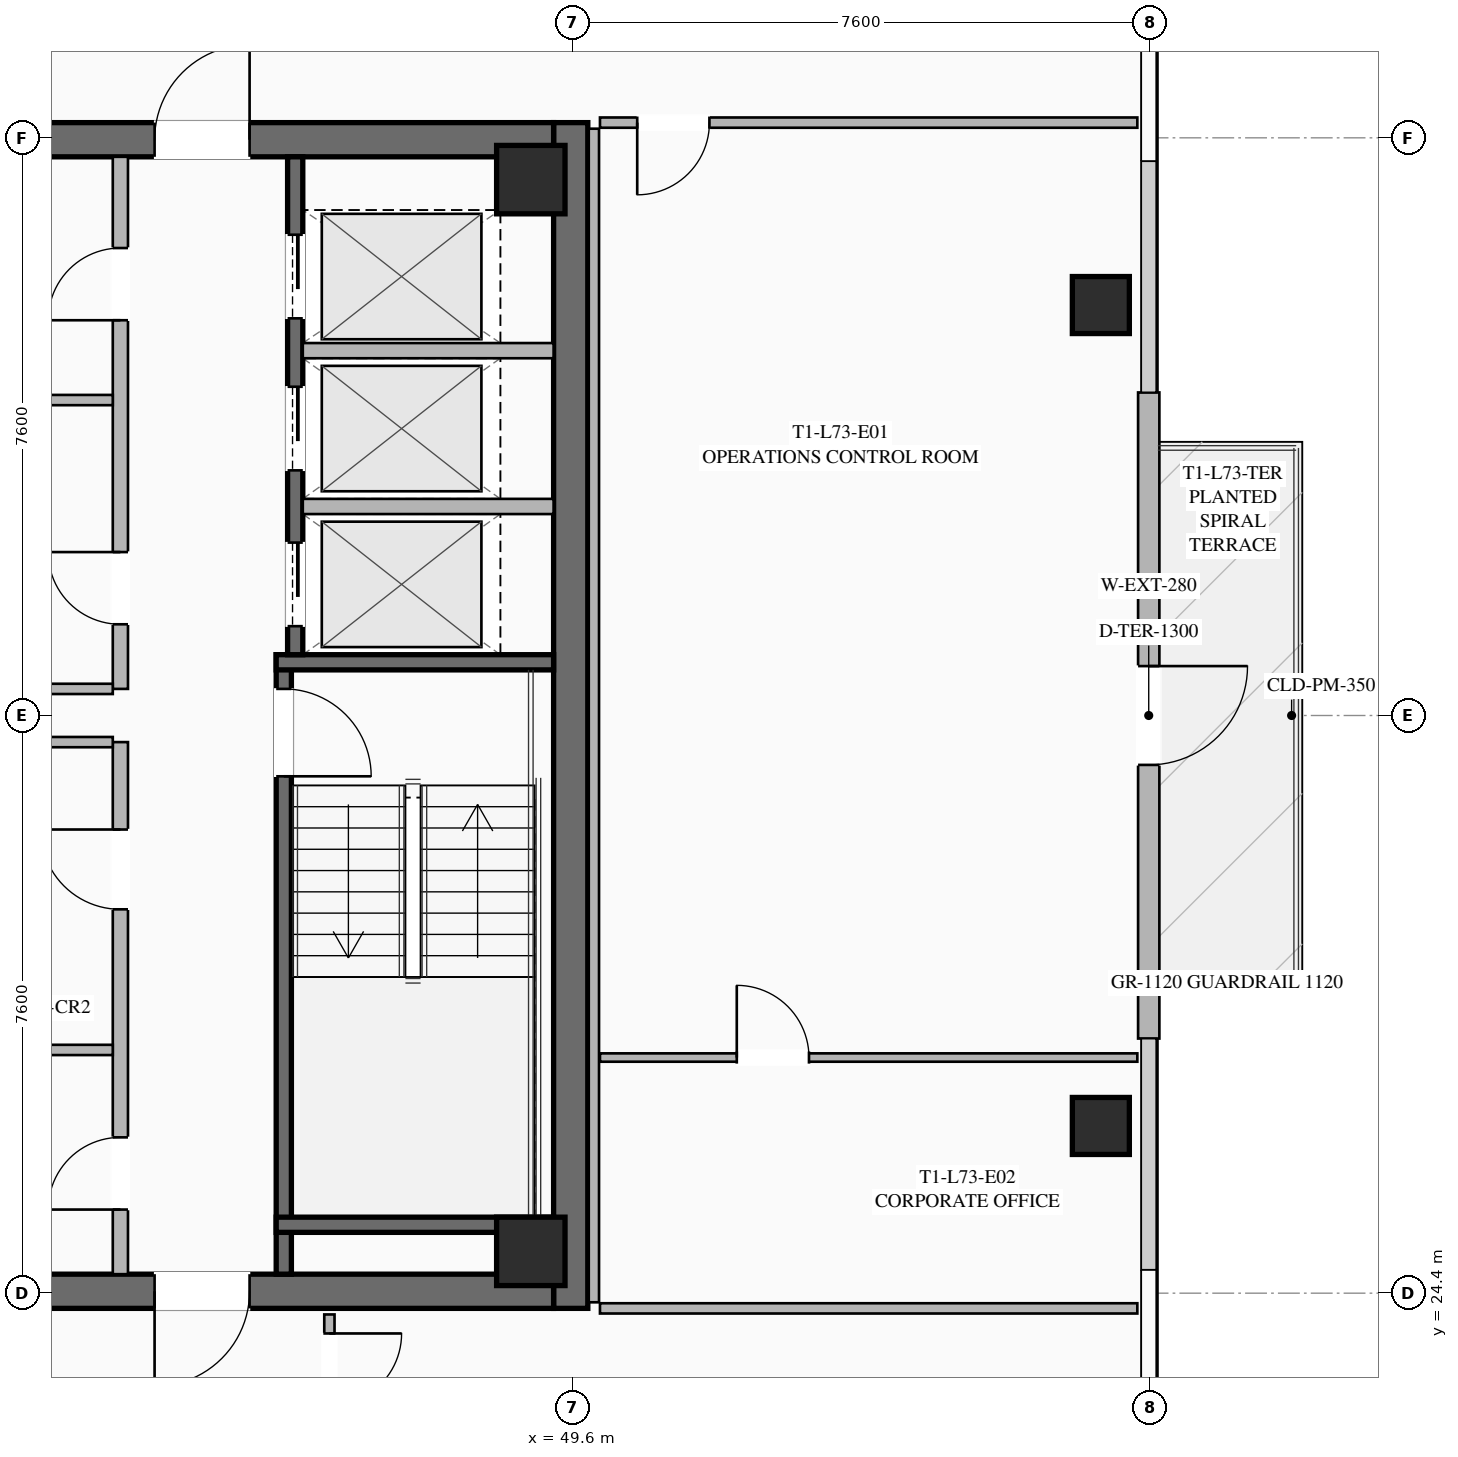
"""IFC4 building model, lengths in metres.
Left out: names, types, materials, properties, quantities, classifications, styles, units other than length and angle.
Written with IfcOpenShell. Run it as: python <this file> out.ifc"""

import sys

from ifc_helpers import new_model, si_unit, direction, frame, frame_2d, origin, origin_2d, place, context, subcontext, project, spatial, rectangle, hollow_rectangle, extrude, element, fill, save


model = new_model("IFC4")
c1 = context("Model", 3, precision=1e-05, world=origin(), true_north=direction((0.0, 1.0)))
c2 = subcontext(c1, "Body", "Model", "MODEL_VIEW")
j1 = project(units=[si_unit("LENGTHUNIT", "METRE"), si_unit("PLANEANGLEUNIT", "RADIAN")], contexts=[c1])
p1 = place(None, origin())
s1 = spatial("IfcSite", under=j1, at=p1, CompositionType="ELEMENT")
p2 = place(p1, origin())
s2 = spatial("IfcBuilding", under=s1, at=p2, CompositionType="ELEMENT")
p3 = place(p2, frame((0.0, 0.0, 270.5)))
s3 = spatial("IfcBuildingStorey", under=s2, at=p3, CompositionType="ELEMENT", Elevation=270.5)
p4 = place(p3, frame((49.575, 39.8, 0.0), z_axis=(0.0, 0.0, 1.0), x_axis=(0.0, -1.0, 0.0)))
e1 = element("IfcWall", 1, at=p4, inside=s3, PredefinedType="SHEAR", context=c2, shape_type="SweptSolid", body=[
    extrude(rectangle(XDim=15.6, YDim=0.45, at=frame_2d((7.8, 0.0))), origin(), (0.0, 0.0, 1.0), 3.55),
])
p5 = place(p3, frame((49.35, 24.425, 0.0), z_axis=(0.0, 0.0, 1.0), x_axis=(-1.0, 0.0, 0.0)))
e2 = element("IfcWall", 2, at=p5, inside=s3, PredefinedType="SHEAR", context=c2, shape_type="SweptSolid", body=[
    extrude(rectangle(XDim=14.7, YDim=0.45, at=frame_2d((7.35, 0.0))), origin(), (0.0, 0.0, 1.0), 3.55),
])
p6 = place(p5, frame((9.05, 0.0, 0.0)))
e3 = element("IfcOpeningElement", 3, at=p6, cuts=e2, PredefinedType="OPENING", context=c2, shape_type="SweptSolid", body=[
    extrude(rectangle(XDim=1.25, YDim=2.25, at=frame_2d((0.625, 1.125))), frame((0.0, 0.235, 0.0), z_axis=(0.0, -1.0, 0.0), x_axis=(1.0, 0.0, 0.0)), (0.0, 0.0, 1.0), 0.47),
])
p7 = place(p5, frame((4.0, 0.0, 0.0)))
e4 = element("IfcOpeningElement", 4, at=p7, cuts=e2, PredefinedType="OPENING", context=c2, shape_type="SweptSolid", body=[
    extrude(rectangle(XDim=1.25, YDim=2.25, at=frame_2d((0.625, 1.125))), frame((0.0, 0.235, 0.0), z_axis=(0.0, -1.0, 0.0), x_axis=(1.0, 0.0, 0.0)), (0.0, 0.0, 1.0), 0.47),
])
p8 = place(p3, frame((34.65, 39.575, 0.0), z_axis=(0.0, 0.0, 1.0), x_axis=(1.0, 0.0, 0.0)))
e5 = element("IfcWall", 5, at=p8, inside=s3, PredefinedType="SHEAR", context=c2, shape_type="SweptSolid", body=[
    extrude(rectangle(XDim=14.7, YDim=0.45, at=frame_2d((7.35, 0.0))), origin(), (0.0, 0.0, 1.0), 3.55),
])
p9 = place(p8, frame((4.4, 0.0, 0.0)))
e6 = element("IfcOpeningElement", 6, at=p9, cuts=e5, PredefinedType="OPENING", context=c2, shape_type="SweptSolid", body=[
    extrude(rectangle(XDim=1.25, YDim=2.25, at=frame_2d((0.625, 1.125))), frame((0.0, 0.235, 0.0), z_axis=(0.0, -1.0, 0.0), x_axis=(1.0, 0.0, 0.0)), (0.0, 0.0, 1.0), 0.47),
])
p10 = place(p8, frame((9.45, 0.0, 0.0)))
e7 = element("IfcOpeningElement", 7, at=p10, cuts=e5, PredefinedType="OPENING", context=c2, shape_type="SweptSolid", body=[
    extrude(rectangle(XDim=1.25, YDim=2.25, at=frame_2d((0.625, 1.125))), frame((0.0, 0.235, 0.0), z_axis=(0.0, -1.0, 0.0), x_axis=(1.0, 0.0, 0.0)), (0.0, 0.0, 1.0), 0.47),
])
for number, where, z_axis, x_axis in (
    (8, (49.05, 24.95, 0.0), (0.0, 0.0, 1.0), (1.0, 0.0, 0.0)),
    (9, (49.05, 39.05, 0.0), (0.0, 0.0, 1.0), (1.0, 0.0, 0.0)),
):
    element("IfcColumn", number, at=place(p3, frame(where, z_axis=z_axis, x_axis=x_axis)), inside=s3, PredefinedType="COLUMN", context=c2, shape_type="SweptSolid", body=[
        extrude(hollow_rectangle(XDim=0.9, YDim=0.9, WallThickness=0.04, at=origin_2d()), origin(), (0.0, 0.0, 1.0), 3.37),
    ])
for number, where, z_axis, x_axis in (
    (10, (56.55, 26.6, 0.0), (0.0, 0.0, 1.0), (1.0, 0.0, 0.0)),
    (11, (56.55, 37.4, 0.0), (0.0, 0.0, 1.0), (1.0, 0.0, 0.0)),
):
    element("IfcColumn", number, at=place(p3, frame(where, z_axis=z_axis, x_axis=x_axis)), inside=s3, PredefinedType="COLUMN", context=c2, shape_type="SweptSolid", body=[
        extrude(hollow_rectangle(XDim=0.75, YDim=0.75, WallThickness=0.032, at=origin_2d()), origin(), (0.0, 0.0, 1.0), 3.37),
    ])
p11 = place(p3, frame((57.18, 36.25, 0.0), z_axis=(0.0, 0.0, 1.0), x_axis=(0.0, -1.0, 0.0)))
e12 = element("IfcWall", 12, at=p11, inside=s3, PredefinedType="SOLIDWALL", context=c2, shape_type="SweptSolid", body=[
    extrude(rectangle(XDim=8.5, YDim=0.28, at=frame_2d((4.25, 0.0))), origin(), (0.0, 0.0, 1.0), 3.37),
])
p12 = place(p11, frame((3.6, 0.0, 0.0)))
e13 = element("IfcOpeningElement", 13, at=p12, cuts=e12, PredefinedType="OPENING", context=c2, shape_type="SweptSolid", body=[
    extrude(rectangle(XDim=1.3, YDim=2.15, at=frame_2d((0.65, 1.075))), frame((0.0, 0.15, 0.0), z_axis=(0.0, -1.0, 0.0), x_axis=(1.0, 0.0, 0.0)), (0.0, 0.0, 1.0), 0.3),
])
p13 = place(p3, frame((45.8, 32.8, 0.0), z_axis=(0.0, 0.0, 1.0), x_axis=(0.0, -1.0, 0.0)))
e14 = element("IfcWall", 14, at=p13, inside=s3, PredefinedType="SHEAR", context=c2, shape_type="SweptSolid", body=[
    extrude(rectangle(XDim=8.15, YDim=0.2, at=frame_2d((4.075, 0.0))), origin(), (0.0, 0.0, 1.0), 3.37),
])
p14 = place(p13, frame((0.45, 0.0, 0.0)))
e15 = element("IfcOpeningElement", 15, at=p14, cuts=e14, PredefinedType="OPENING", context=c2, shape_type="SweptSolid", body=[
    extrude(rectangle(XDim=1.15, YDim=2.2, at=frame_2d((0.575, 1.1))), frame((0.0, 0.11, 0.0), z_axis=(0.0, -1.0, 0.0), x_axis=(1.0, 0.0, 0.0)), (0.0, 0.0, 1.0), 0.22),
])
for number, where, z_axis, x_axis in (
    (16, (45.7, 32.7, 0.0), (0.0, 0.0, 1.0), (1.0, 0.0, 0.0)),
    (17, (45.7, 25.3, 0.0), (0.0, 0.0, 1.0), (1.0, 0.0, 0.0)),
):
    element("IfcWall", number, at=place(p3, frame(where, z_axis=z_axis, x_axis=x_axis)), inside=s3, PredefinedType="SHEAR", context=c2, shape_type="SweptSolid", body=[
        extrude(rectangle(XDim=3.65, YDim=0.2, at=frame_2d((1.825, 0.0))), origin(), (0.0, 0.0, 1.0), 3.37),
    ])
p15 = place(p3, frame((45.95, 39.35, 0.0), z_axis=(0.0, 0.0, 1.0), x_axis=(0.0, -1.0, 0.0)))
e18 = element("IfcWall", 18, at=p15, inside=s3, PredefinedType="SHEAR", context=c2, shape_type="SweptSolid", body=[
    extrude(rectangle(XDim=6.55, YDim=0.2, at=frame_2d((3.275, 0.0))), origin(), (0.0, 0.0, 1.0), 3.37),
])
p16 = place(p15, frame((5.075, 0.0, 0.0)))
e19 = element("IfcOpeningElement", 19, at=p16, cuts=e18, PredefinedType="OPENING", context=c2, shape_type="SweptSolid", body=[
    extrude(rectangle(XDim=1.1, YDim=2.2, at=frame_2d((0.55, 1.1))), frame((0.0, 0.11, 0.0), z_axis=(0.0, -1.0, 0.0), x_axis=(1.0, 0.0, 0.0)), (0.0, 0.0, 1.0), 0.22),
])
p17 = place(p15, frame((3.025, 0.0, 0.0)))
e20 = element("IfcOpeningElement", 20, at=p17, cuts=e18, PredefinedType="OPENING", context=c2, shape_type="SweptSolid", body=[
    extrude(rectangle(XDim=1.1, YDim=2.2, at=frame_2d((0.55, 1.1))), frame((0.0, 0.11, 0.0), z_axis=(0.0, -1.0, 0.0), x_axis=(1.0, 0.0, 0.0)), (0.0, 0.0, 1.0), 0.22),
])
p18 = place(p15, frame((1.025, 0.0, 0.0)))
e21 = element("IfcOpeningElement", 21, at=p18, cuts=e18, PredefinedType="OPENING", context=c2, shape_type="SweptSolid", body=[
    extrude(rectangle(XDim=1.1, YDim=2.2, at=frame_2d((0.55, 1.1))), frame((0.0, 0.11, 0.0), z_axis=(0.0, -1.0, 0.0), x_axis=(1.0, 0.0, 0.0)), (0.0, 0.0, 1.0), 0.22),
])
for number, where, z_axis, x_axis in (
    (22, (46.05, 34.75, 0.0), (0.0, 0.0, 1.0), (1.0, 0.0, 0.0)),
    (23, (46.05, 36.8, 0.0), (0.0, 0.0, 1.0), (1.0, 0.0, 0.0)),
):
    element("IfcWall", number, at=place(p3, frame(where, z_axis=z_axis, x_axis=x_axis)), inside=s3, PredefinedType="SOLIDWALL", context=c2, shape_type="SweptSolid", body=[
        extrude(rectangle(XDim=3.3, YDim=0.2, at=frame_2d((1.65, 0.0))), origin(), (0.0, 0.0, 1.0), 3.37),
    ])
p19 = place(p3, frame((43.65, 24.65, 0.0), z_axis=(0.0, 0.0, 1.0), x_axis=(0.0, 1.0, 0.0)))
e24 = element("IfcWall", 24, at=p19, inside=s3, PredefinedType="SOLIDWALL", context=c2, shape_type="SweptSolid", body=[
    extrude(rectangle(XDim=7.0, YDim=0.2, at=frame_2d((3.5, 0.0))), origin(), (0.0, 0.0, 1.0), 2.723),
])
p20 = place(p19, frame((0.85, 0.0, 0.0)))
e25 = element("IfcOpeningElement", 25, at=p20, cuts=e24, PredefinedType="OPENING", context=c2, shape_type="SweptSolid", body=[
    extrude(rectangle(XDim=0.95, YDim=2.05, at=frame_2d((0.475, 1.025))), frame((0.0, 0.11, 0.0), z_axis=(0.0, -1.0, 0.0), x_axis=(1.0, 0.0, 0.0)), (0.0, 0.0, 1.0), 0.22),
])
p21 = place(p19, frame((4.8, 0.0, 0.0)))
e26 = element("IfcOpeningElement", 26, at=p21, cuts=e24, PredefinedType="OPENING", context=c2, shape_type="SweptSolid", body=[
    extrude(rectangle(XDim=1.05, YDim=2.2, at=frame_2d((0.525, 1.1))), frame((0.0, 0.11, 0.0), z_axis=(0.0, -1.0, 0.0), x_axis=(1.0, 0.0, 0.0)), (0.0, 0.0, 1.0), 0.22),
])
for number, where, z_axis, x_axis in (
    (27, (41.67, 31.65, 0.0), (0.0, 0.0, 1.0), (1.0, 0.0, 0.0)),
    (28, (41.67, 27.6, 0.0), (0.0, 0.0, 1.0), (1.0, 0.0, 0.0)),
):
    element("IfcWall", number, at=place(p3, frame(where, z_axis=z_axis, x_axis=x_axis)), inside=s3, PredefinedType="PARTITIONING", context=c2, shape_type="SweptSolid", body=[
        extrude(rectangle(XDim=1.88, YDim=0.135, at=frame_2d((0.94, 0.0))), origin(), (0.0, 0.0, 1.0), 2.723),
    ])
p22 = place(p3, frame((43.65, 32.35, 0.0), z_axis=(0.0, 0.0, 1.0), x_axis=(0.0, 1.0, 0.0)))
e29 = element("IfcWall", 29, at=p22, inside=s3, PredefinedType="SOLIDWALL", context=c2, shape_type="SweptSolid", body=[
    extrude(rectangle(XDim=7.0, YDim=0.2, at=frame_2d((3.5, 0.0))), origin(), (0.0, 0.0, 1.0), 2.723),
])
p23 = place(p22, frame((0.85, 0.0, 0.0)))
e30 = element("IfcOpeningElement", 30, at=p23, cuts=e29, PredefinedType="OPENING", context=c2, shape_type="SweptSolid", body=[
    extrude(rectangle(XDim=0.95, YDim=2.05, at=frame_2d((0.475, 1.025))), frame((0.0, 0.11, 0.0), z_axis=(0.0, -1.0, 0.0), x_axis=(1.0, 0.0, 0.0)), (0.0, 0.0, 1.0), 0.22),
])
p24 = place(p22, frame((4.85, 0.0, 0.0)))
e31 = element("IfcOpeningElement", 31, at=p24, cuts=e29, PredefinedType="OPENING", context=c2, shape_type="SweptSolid", body=[
    extrude(rectangle(XDim=0.95, YDim=2.05, at=frame_2d((0.475, 1.025))), frame((0.0, 0.11, 0.0), z_axis=(0.0, -1.0, 0.0), x_axis=(1.0, 0.0, 0.0)), (0.0, 0.0, 1.0), 0.22),
])
for number, where, z_axis, x_axis in (
    (32, (41.67, 32.35, 0.0), (0.0, 0.0, 1.0), (1.0, 0.0, 0.0)),
    (33, (41.67, 36.15, 0.0), (0.0, 0.0, 1.0), (1.0, 0.0, 0.0)),
):
    element("IfcWall", number, at=place(p3, frame(where, z_axis=z_axis, x_axis=x_axis)), inside=s3, PredefinedType="PARTITIONING", context=c2, shape_type="SweptSolid", body=[
        extrude(rectangle(XDim=1.88, YDim=0.135, at=frame_2d((0.94, 0.0))), origin(), (0.0, 0.0, 1.0), 2.723),
    ])
p25 = place(p3, frame((46.4, 24.12, 0.0), z_axis=(0.0, 0.0, 1.0), x_axis=(0.0, -1.0, 0.0)))
e34 = element("IfcWall", 34, at=p25, inside=s3, PredefinedType="PARTITIONING", context=c2, shape_type="SweptSolid", body=[
    extrude(rectangle(XDim=1.49, YDim=0.135, at=frame_2d((0.745, 0.0))), origin(), (0.0, 0.0, 1.0), 2.723),
])
p26 = place(p25, frame((0.25, 0.0, 0.0)))
e35 = element("IfcOpeningElement", 35, at=p26, cuts=e34, PredefinedType="OPENING", context=c2, shape_type="SweptSolid", body=[
    extrude(rectangle(XDim=0.95, YDim=2.05, at=frame_2d((0.475, 1.025))), frame((0.0, 0.077, 0.0), z_axis=(0.0, -1.0, 0.0), x_axis=(1.0, 0.0, 0.0)), (0.0, 0.0, 1.0), 0.155),
])
p27 = place(p3, frame((49.88, 39.72, 0.0), z_axis=(0.0, 0.0, 1.0), x_axis=(0.0, -1.0, 0.0)))
e36 = element("IfcWall", 36, at=p27, inside=s3, PredefinedType="PARTITIONING", context=c2, shape_type="SweptSolid", body=[
    extrude(rectangle(XDim=15.44, YDim=0.135, at=frame_2d((7.72, 0.0))), origin(), (0.0, 0.0, 1.0), 2.723),
])
p28 = place(p3, frame((57.03, 39.8, 0.0), z_axis=(0.0, 0.0, 1.0), x_axis=(-1.0, 0.0, 0.0)))
e37 = element("IfcWall", 37, at=p28, inside=s3, PredefinedType="PARTITIONING", context=c2, shape_type="SweptSolid", body=[
    extrude(rectangle(XDim=7.07, YDim=0.135, at=frame_2d((3.535, 0.0))), origin(), (0.0, 0.0, 1.0), 2.723),
])
p29 = place(p28, frame((5.63, 0.0, 0.0)))
e38 = element("IfcOpeningElement", 38, at=p29, cuts=e37, PredefinedType="OPENING", context=c2, shape_type="SweptSolid", body=[
    extrude(rectangle(XDim=0.95, YDim=2.05, at=frame_2d((0.475, 1.025))), frame((0.0, 0.077, 0.0), z_axis=(0.0, -1.0, 0.0), x_axis=(1.0, 0.0, 0.0)), (0.0, 0.0, 1.0), 0.155),
])
p30 = place(p3, frame((49.96, 24.2, 0.0), z_axis=(0.0, 0.0, 1.0), x_axis=(1.0, 0.0, 0.0)))
e39 = element("IfcWall", 39, at=p30, inside=s3, PredefinedType="PARTITIONING", context=c2, shape_type="SweptSolid", body=[
    extrude(rectangle(XDim=7.07, YDim=0.135, at=frame_2d((3.535, 0.0))), origin(), (0.0, 0.0, 1.0), 2.723),
])
p31 = place(p3, frame((49.96, 27.5, 0.0), z_axis=(0.0, 0.0, 1.0), x_axis=(1.0, 0.0, 0.0)))
e40 = element("IfcWall", 40, at=p31, inside=s3, PredefinedType="PARTITIONING", context=c2, shape_type="SweptSolid", body=[
    extrude(rectangle(XDim=7.07, YDim=0.11, at=frame_2d((3.535, 0.0))), origin(), (0.0, 0.0, 1.0), 2.723),
])
p32 = place(p31, frame((1.8, 0.0, 0.0)))
e41 = element("IfcOpeningElement", 41, at=p32, cuts=e40, PredefinedType="OPENING", context=c2, shape_type="SweptSolid", body=[
    extrude(rectangle(XDim=0.95, YDim=2.05, at=frame_2d((0.475, 1.025))), frame((0.0, 0.065, 0.0), z_axis=(0.0, -1.0, 0.0), x_axis=(1.0, 0.0, 0.0)), (0.0, 0.0, 1.0), 0.13),
])
p33 = place(p12, origin())
e42 = element("IfcDoor", 42, at=p33, inside=s3, OperationType="SINGLE_SWING_LEFT", PredefinedType="DOOR", context=c2, shape_type="SweptSolid", body=[
    extrude(rectangle(XDim=1.3, YDim=2.15, at=frame_2d((0.65, 1.075))), frame((0.0, 0.025, 0.0), z_axis=(0.0, -1.0, 0.0), x_axis=(1.0, 0.0, 0.0)), (0.0, 0.0, 1.0), 0.05),
])
fill(e13, e42)
p34 = place(p10, origin())
e43 = element("IfcDoor", 43, at=p34, inside=s3, OperationType="SINGLE_SWING_RIGHT", PredefinedType="DOOR", context=c2, shape_type="SweptSolid", body=[
    extrude(rectangle(XDim=1.25, YDim=2.25, at=frame_2d((0.625, 1.125))), frame((0.0, 0.025, 0.0), z_axis=(0.0, -1.0, 0.0), x_axis=(1.0, 0.0, 0.0)), (0.0, 0.0, 1.0), 0.05),
])
fill(e7, e43)
p35 = place(p7, origin())
e44 = element("IfcDoor", 44, at=p35, inside=s3, OperationType="SINGLE_SWING_RIGHT", PredefinedType="DOOR", context=c2, shape_type="SweptSolid", body=[
    extrude(rectangle(XDim=1.25, YDim=2.25, at=frame_2d((0.625, 1.125))), frame((0.0, 0.025, 0.0), z_axis=(0.0, -1.0, 0.0), x_axis=(1.0, 0.0, 0.0)), (0.0, 0.0, 1.0), 0.05),
])
fill(e4, e44)
p36 = place(p14, origin())
e45 = element("IfcDoor", 45, at=p36, inside=s3, OperationType="SINGLE_SWING_RIGHT", PredefinedType="DOOR", context=c2, shape_type="SweptSolid", body=[
    extrude(rectangle(XDim=1.15, YDim=2.2, at=frame_2d((0.575, 1.1))), frame((0.0, 0.025, 0.0), z_axis=(0.0, -1.0, 0.0), x_axis=(1.0, 0.0, 0.0)), (0.0, 0.0, 1.0), 0.05),
])
fill(e15, e45)
p37 = place(p20, origin())
e46 = element("IfcDoor", 46, at=p37, inside=s3, OperationType="SINGLE_SWING_LEFT", PredefinedType="DOOR", context=c2, shape_type="SweptSolid", body=[
    extrude(rectangle(XDim=0.95, YDim=2.05, at=frame_2d((0.475, 1.025))), frame((0.0, 0.025, 0.0), z_axis=(0.0, -1.0, 0.0), x_axis=(1.0, 0.0, 0.0)), (0.0, 0.0, 1.0), 0.05),
])
fill(e25, e46)
p38 = place(p21, origin())
e47 = element("IfcDoor", 47, at=p38, inside=s3, OperationType="SINGLE_SWING_RIGHT", PredefinedType="DOOR", context=c2, shape_type="SweptSolid", body=[
    extrude(rectangle(XDim=1.05, YDim=2.2, at=frame_2d((0.525, 1.1))), frame((0.0, 0.025, 0.0), z_axis=(0.0, -1.0, 0.0), x_axis=(1.0, 0.0, 0.0)), (0.0, 0.0, 1.0), 0.05),
])
fill(e26, e47)
p39 = place(p23, origin())
e48 = element("IfcDoor", 48, at=p39, inside=s3, OperationType="SINGLE_SWING_RIGHT", PredefinedType="DOOR", context=c2, shape_type="SweptSolid", body=[
    extrude(rectangle(XDim=0.95, YDim=2.05, at=frame_2d((0.475, 1.025))), frame((0.0, 0.025, 0.0), z_axis=(0.0, -1.0, 0.0), x_axis=(1.0, 0.0, 0.0)), (0.0, 0.0, 1.0), 0.05),
])
fill(e30, e48)
p40 = place(p24, origin())
e49 = element("IfcDoor", 49, at=p40, inside=s3, OperationType="SINGLE_SWING_LEFT", PredefinedType="DOOR", context=c2, shape_type="SweptSolid", body=[
    extrude(rectangle(XDim=0.95, YDim=2.05, at=frame_2d((0.475, 1.025))), frame((0.0, 0.025, 0.0), z_axis=(0.0, -1.0, 0.0), x_axis=(1.0, 0.0, 0.0)), (0.0, 0.0, 1.0), 0.05),
])
fill(e31, e49)
p41 = place(p26, origin())
e50 = element("IfcDoor", 50, at=p41, inside=s3, OperationType="SINGLE_SWING_LEFT", PredefinedType="DOOR", context=c2, shape_type="SweptSolid", body=[
    extrude(rectangle(XDim=0.95, YDim=2.05, at=frame_2d((0.475, 1.025))), frame((0.0, 0.025, 0.0), z_axis=(0.0, -1.0, 0.0), x_axis=(1.0, 0.0, 0.0)), (0.0, 0.0, 1.0), 0.05),
])
fill(e35, e50)
p42 = place(p29, origin())
e51 = element("IfcDoor", 51, at=p42, inside=s3, OperationType="SINGLE_SWING_RIGHT", PredefinedType="DOOR", context=c2, shape_type="SweptSolid", body=[
    extrude(rectangle(XDim=0.95, YDim=2.05, at=frame_2d((0.475, 1.025))), frame((0.0, 0.025, 0.0), z_axis=(0.0, -1.0, 0.0), x_axis=(1.0, 0.0, 0.0)), (0.0, 0.0, 1.0), 0.05),
])
fill(e38, e51)
p43 = place(p32, origin())
e52 = element("IfcDoor", 52, at=p43, inside=s3, OperationType="SINGLE_SWING_LEFT", PredefinedType="DOOR", context=c2, shape_type="SweptSolid", body=[
    extrude(rectangle(XDim=0.95, YDim=2.05, at=frame_2d((0.475, 1.025))), frame((0.0, 0.025, 0.0), z_axis=(0.0, -1.0, 0.0), x_axis=(1.0, 0.0, 0.0)), (0.0, 0.0, 1.0), 0.05),
])
fill(e41, e52)
p44 = place(p16, origin())
e53 = element("IfcDoor", 53, at=p44, inside=s3, OperationType="SLIDING_TO_LEFT", PredefinedType="DOOR", context=c2, shape_type="SweptSolid", body=[
    extrude(rectangle(XDim=1.1, YDim=2.2, at=frame_2d((0.55, 1.1))), frame((0.0, 0.025, 0.0), z_axis=(0.0, -1.0, 0.0), x_axis=(1.0, 0.0, 0.0)), (0.0, 0.0, 1.0), 0.05),
])
fill(e19, e53)
p45 = place(p17, origin())
e54 = element("IfcDoor", 54, at=p45, inside=s3, OperationType="SLIDING_TO_LEFT", PredefinedType="DOOR", context=c2, shape_type="SweptSolid", body=[
    extrude(rectangle(XDim=1.1, YDim=2.2, at=frame_2d((0.55, 1.1))), frame((0.0, 0.025, 0.0), z_axis=(0.0, -1.0, 0.0), x_axis=(1.0, 0.0, 0.0)), (0.0, 0.0, 1.0), 0.05),
])
fill(e20, e54)
p46 = place(p18, origin())
e55 = element("IfcDoor", 55, at=p46, inside=s3, OperationType="SLIDING_TO_LEFT", PredefinedType="DOOR", context=c2, shape_type="SweptSolid", body=[
    extrude(rectangle(XDim=1.1, YDim=2.2, at=frame_2d((0.55, 1.1))), frame((0.0, 0.025, 0.0), z_axis=(0.0, -1.0, 0.0), x_axis=(1.0, 0.0, 0.0)), (0.0, 0.0, 1.0), 0.05),
])
fill(e21, e55)
save(model, sys.argv[1])
